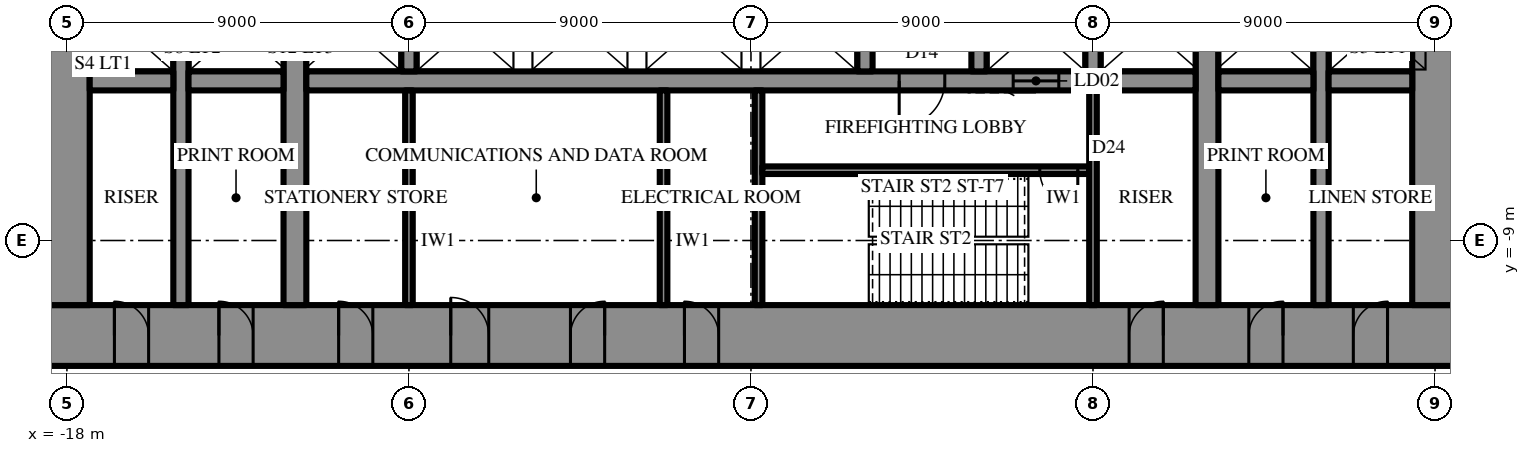
"""IFC4 building model, lengths in metres.
Left out: names, types, materials, properties, quantities, classifications, styles, units other than length and angle.
Written with IfcOpenShell. Run it as: python <this file> out.ifc"""

import sys

from ifc_helpers import new_model, si_unit, direction, frame, frame_2d, origin, place, context, subcontext, project, spatial, rectangle, extrude, element, fill, save


model = new_model("IFC4")
c1 = context("Model", 3, precision=1e-05, world=origin(), true_north=direction((0.0, 1.0)))
c2 = subcontext(c1, "Body", "Model", "MODEL_VIEW")
j1 = project(units=[si_unit("LENGTHUNIT", "METRE"), si_unit("PLANEANGLEUNIT", "RADIAN")], contexts=[c1])
p1 = place(None, origin())
s1 = spatial("IfcSite", under=j1, at=p1, CompositionType="ELEMENT")
p2 = place(p1, origin())
s2 = spatial("IfcBuilding", under=s1, at=p2, CompositionType="ELEMENT")
p3 = place(p2, frame((0.0, 0.0, 13.0)))
s3 = spatial("IfcBuildingStorey", under=s2, at=p3, CompositionType="ELEMENT", Elevation=13.0)
p4 = place(p3, frame((18.6, -11.5, 0.0), z_axis=(0.0, 0.0, 1.0), x_axis=(-1.0, 0.0, 0.0)))
e1 = element("IfcWall", 1, at=p4, inside=s3, PredefinedType="SHEAR", context=c2, shape_type="SweptSolid", body=[
    extrude(rectangle(XDim=37.2, YDim=1.6, at=frame_2d((18.6, 0.0))), origin(), (0.0, 0.0, 1.0), 5.5),
])
p5 = place(p4, frame((19.45, 0.0, 0.0)))
e2 = element("IfcOpeningElement", 2, at=p5, cuts=e1, PredefinedType="OPENING", context=c2, shape_type="SweptSolid", body=[
    extrude(rectangle(XDim=0.9, YDim=2.2, at=frame_2d((0.45, 1.1))), frame((0.0, 0.81, 0.0), z_axis=(0.0, -1.0, 0.0), x_axis=(1.0, 0.0, 0.0)), (0.0, 0.0, 1.0), 1.62),
])
p6 = place(p4, frame((22.45, 0.0, 0.0)))
e3 = element("IfcOpeningElement", 3, at=p6, cuts=e1, PredefinedType="OPENING", context=c2, shape_type="SweptSolid", body=[
    extrude(rectangle(XDim=0.9, YDim=2.2, at=frame_2d((0.45, 1.1))), frame((0.0, 0.81, 0.0), z_axis=(0.0, -1.0, 0.0), x_axis=(1.0, 0.0, 0.0)), (0.0, 0.0, 1.0), 1.62),
])
p7 = place(p4, frame((25.5, 0.0, 0.0)))
e4 = element("IfcOpeningElement", 4, at=p7, cuts=e1, PredefinedType="OPENING", context=c2, shape_type="SweptSolid", body=[
    extrude(rectangle(XDim=1.0, YDim=2.2, at=frame_2d((0.5, 1.1))), frame((0.0, 0.81, 0.0), z_axis=(0.0, -1.0, 0.0), x_axis=(1.0, 0.0, 0.0)), (0.0, 0.0, 1.0), 1.62),
])
p8 = place(p4, frame((1.85, 0.0, 0.0)))
e5 = element("IfcOpeningElement", 5, at=p8, cuts=e1, PredefinedType="OPENING", context=c2, shape_type="SweptSolid", body=[
    extrude(rectangle(XDim=0.9, YDim=2.2, at=frame_2d((0.45, 1.1))), frame((0.0, 0.81, 0.0), z_axis=(0.0, -1.0, 0.0), x_axis=(1.0, 0.0, 0.0)), (0.0, 0.0, 1.0), 1.62),
])
p9 = place(p4, frame((4.6, 0.0, 0.0)))
e6 = element("IfcOpeningElement", 6, at=p9, cuts=e1, PredefinedType="OPENING", context=c2, shape_type="SweptSolid", body=[
    extrude(rectangle(XDim=0.9, YDim=2.2, at=frame_2d((0.45, 1.1))), frame((0.0, 0.81, 0.0), z_axis=(0.0, -1.0, 0.0), x_axis=(1.0, 0.0, 0.0)), (0.0, 0.0, 1.0), 1.62),
])
p10 = place(p4, frame((7.75, 0.0, 0.0)))
e7 = element("IfcOpeningElement", 7, at=p10, cuts=e1, PredefinedType="OPENING", context=c2, shape_type="SweptSolid", body=[
    extrude(rectangle(XDim=0.9, YDim=2.2, at=frame_2d((0.45, 1.1))), frame((0.0, 0.81, 0.0), z_axis=(0.0, -1.0, 0.0), x_axis=(1.0, 0.0, 0.0)), (0.0, 0.0, 1.0), 1.62),
])
p11 = place(p4, frame((28.55, 0.0, 0.0)))
e8 = element("IfcOpeningElement", 8, at=p11, cuts=e1, PredefinedType="OPENING", context=c2, shape_type="SweptSolid", body=[
    extrude(rectangle(XDim=0.9, YDim=2.2, at=frame_2d((0.45, 1.1))), frame((0.0, 0.81, 0.0), z_axis=(0.0, -1.0, 0.0), x_axis=(1.0, 0.0, 0.0)), (0.0, 0.0, 1.0), 1.62),
])
p12 = place(p4, frame((31.7, 0.0, 0.0)))
e9 = element("IfcOpeningElement", 9, at=p12, cuts=e1, PredefinedType="OPENING", context=c2, shape_type="SweptSolid", body=[
    extrude(rectangle(XDim=0.9, YDim=2.2, at=frame_2d((0.45, 1.1))), frame((0.0, 0.81, 0.0), z_axis=(0.0, -1.0, 0.0), x_axis=(1.0, 0.0, 0.0)), (0.0, 0.0, 1.0), 1.62),
])
p13 = place(p4, frame((34.45, 0.0, 0.0)))
e10 = element("IfcOpeningElement", 10, at=p13, cuts=e1, PredefinedType="OPENING", context=c2, shape_type="SweptSolid", body=[
    extrude(rectangle(XDim=0.9, YDim=2.2, at=frame_2d((0.45, 1.1))), frame((0.0, 0.81, 0.0), z_axis=(0.0, -1.0, 0.0), x_axis=(1.0, 0.0, 0.0)), (0.0, 0.0, 1.0), 1.62),
])
p14 = place(p3, frame((18.0, -10.7, 0.0), z_axis=(0.0, 0.0, 1.0), x_axis=(0.0, 1.0, 0.0)))
e11 = element("IfcWall", 11, at=p14, inside=s3, PredefinedType="SHEAR", context=c2, shape_type="SweptSolid", body=[
    extrude(rectangle(XDim=21.4, YDim=1.2, at=frame_2d((10.7, 0.0))), origin(), (0.0, 0.0, 1.0), 5.5),
])
p15 = place(p14, frame((9.8, 0.0, 0.0)))
e12 = element("IfcOpeningElement", 12, at=p15, cuts=e11, PredefinedType="OPENING", context=c2, shape_type="SweptSolid", body=[
    extrude(rectangle(XDim=1.8, YDim=2.4, at=frame_2d((0.9, 1.2))), frame((0.0, 0.61, 0.0), z_axis=(0.0, -1.0, 0.0), x_axis=(1.0, 0.0, 0.0)), (0.0, 0.0, 1.0), 1.22),
])
p16 = place(p3, frame((-18.0, 10.7, 0.0), z_axis=(0.0, 0.0, 1.0), x_axis=(0.0, -1.0, 0.0)))
e13 = element("IfcWall", 13, at=p16, inside=s3, PredefinedType="SHEAR", context=c2, shape_type="SweptSolid", body=[
    extrude(rectangle(XDim=21.4, YDim=1.2, at=frame_2d((10.7, 0.0))), origin(), (0.0, 0.0, 1.0), 5.5),
])
p17 = place(p16, frame((9.8, 0.0, 0.0)))
e14 = element("IfcOpeningElement", 14, at=p17, cuts=e13, PredefinedType="OPENING", context=c2, shape_type="SweptSolid", body=[
    extrude(rectangle(XDim=1.8, YDim=2.4, at=frame_2d((0.9, 1.2))), frame((0.0, 0.61, 0.0), z_axis=(0.0, -1.0, 0.0), x_axis=(1.0, 0.0, 0.0)), (0.0, 0.0, 1.0), 1.22),
])
p18 = place(p3, frame((12.0, -10.7, 0.0), z_axis=(0.0, 0.0, 1.0), x_axis=(0.0, 1.0, 0.0)))
e15 = element("IfcWall", 15, at=p18, inside=s3, PredefinedType="SHEAR", context=c2, shape_type="SweptSolid", body=[
    extrude(rectangle(XDim=21.4, YDim=0.6, at=frame_2d((10.7, 0.0))), origin(), (0.0, 0.0, 1.0), 5.5),
])
p19 = place(p18, frame((9.8, 0.0, 0.0)))
e16 = element("IfcOpeningElement", 16, at=p19, cuts=e15, PredefinedType="OPENING", context=c2, shape_type="SweptSolid", body=[
    extrude(rectangle(XDim=1.8, YDim=2.4, at=frame_2d((0.9, 1.2))), frame((0.0, 0.31, 0.0), z_axis=(0.0, -1.0, 0.0), x_axis=(1.0, 0.0, 0.0)), (0.0, 0.0, 1.0), 0.62),
])
p20 = place(p3, frame((-12.0, -10.7, 0.0), z_axis=(0.0, 0.0, 1.0), x_axis=(0.0, 1.0, 0.0)))
e17 = element("IfcWall", 17, at=p20, inside=s3, PredefinedType="SHEAR", context=c2, shape_type="SweptSolid", body=[
    extrude(rectangle(XDim=21.4, YDim=0.6, at=frame_2d((10.7, 0.0))), origin(), (0.0, 0.0, 1.0), 5.5),
])
p21 = place(p20, frame((9.8, 0.0, 0.0)))
e18 = element("IfcOpeningElement", 18, at=p21, cuts=e17, PredefinedType="OPENING", context=c2, shape_type="SweptSolid", body=[
    extrude(rectangle(XDim=1.8, YDim=2.4, at=frame_2d((0.9, 1.2))), frame((0.0, 0.31, 0.0), z_axis=(0.0, -1.0, 0.0), x_axis=(1.0, 0.0, 0.0)), (0.0, 0.0, 1.0), 0.62),
])
p22 = place(p3, frame((15.0, -10.7, 0.0), z_axis=(0.0, 0.0, 1.0), x_axis=(0.0, 1.0, 0.0)))
e19 = element("IfcWall", 19, at=p22, inside=s3, PredefinedType="SHEAR", context=c2, shape_type="SweptSolid", body=[
    extrude(rectangle(XDim=21.4, YDim=0.4, at=frame_2d((10.7, 0.0))), origin(), (0.0, 0.0, 1.0), 5.5),
])
p23 = place(p22, frame((9.8, 0.0, 0.0)))
e20 = element("IfcOpeningElement", 20, at=p23, cuts=e19, PredefinedType="OPENING", context=c2, shape_type="SweptSolid", body=[
    extrude(rectangle(XDim=1.8, YDim=2.4, at=frame_2d((0.9, 1.2))), frame((0.0, 0.21, 0.0), z_axis=(0.0, -1.0, 0.0), x_axis=(1.0, 0.0, 0.0)), (0.0, 0.0, 1.0), 0.42),
])
p24 = place(p3, frame((-15.0, -10.7, 0.0), z_axis=(0.0, 0.0, 1.0), x_axis=(0.0, 1.0, 0.0)))
e21 = element("IfcWall", 21, at=p24, inside=s3, PredefinedType="SHEAR", context=c2, shape_type="SweptSolid", body=[
    extrude(rectangle(XDim=21.4, YDim=0.4, at=frame_2d((10.7, 0.0))), origin(), (0.0, 0.0, 1.0), 5.5),
])
p25 = place(p24, frame((9.8, 0.0, 0.0)))
e22 = element("IfcOpeningElement", 22, at=p25, cuts=e21, PredefinedType="OPENING", context=c2, shape_type="SweptSolid", body=[
    extrude(rectangle(XDim=1.8, YDim=2.4, at=frame_2d((0.9, 1.2))), frame((0.0, 0.21, 0.0), z_axis=(0.0, -1.0, 0.0), x_axis=(1.0, 0.0, 0.0)), (0.0, 0.0, 1.0), 0.42),
])
p26 = place(p3, frame((17.4, -4.8, 0.0), z_axis=(0.0, 0.0, 1.0), x_axis=(-1.0, 0.0, 0.0)))
e23 = element("IfcWall", 23, at=p26, inside=s3, PredefinedType="SHEAR", context=c2, shape_type="SweptSolid", body=[
    extrude(rectangle(XDim=2.2, YDim=0.5, at=frame_2d((1.1, 0.0))), origin(), (0.0, 0.0, 1.0), 5.5),
])
p27 = place(p3, frame((14.8, -4.8, 0.0), z_axis=(0.0, 0.0, 1.0), x_axis=(-1.0, 0.0, 0.0)))
e24 = element("IfcWall", 24, at=p27, inside=s3, PredefinedType="SHEAR", context=c2, shape_type="SweptSolid", body=[
    extrude(rectangle(XDim=2.5, YDim=0.5, at=frame_2d((1.25, 0.0))), origin(), (0.0, 0.0, 1.0), 5.5),
])
p28 = place(p3, frame((11.7, -4.8, 0.0), z_axis=(0.0, 0.0, 1.0), x_axis=(-1.0, 0.0, 0.0)))
e25 = element("IfcWall", 25, at=p28, inside=s3, PredefinedType="SHEAR", context=c2, shape_type="SweptSolid", body=[
    extrude(rectangle(XDim=23.4, YDim=0.5, at=frame_2d((11.7, 0.0))), origin(), (0.0, 0.0, 1.0), 5.5),
])
p29 = place(p28, frame((6.6, 0.0, 0.0)))
e26 = element("IfcOpeningElement", 26, at=p29, cuts=e25, PredefinedType="OPENING", context=c2, shape_type="SweptSolid", body=[
    extrude(rectangle(XDim=1.2, YDim=2.2, at=frame_2d((0.6, 1.1))), frame((0.0, 0.26, 0.0), z_axis=(0.0, -1.0, 0.0), x_axis=(1.0, 0.0, 0.0)), (0.0, 0.0, 1.0), 0.52),
])
p30 = place(p28, frame((3.6, 0.0, 0.0)))
e27 = element("IfcOpeningElement", 27, at=p30, cuts=e25, PredefinedType="OPENING", context=c2, shape_type="SweptSolid", body=[
    extrude(rectangle(XDim=1.2, YDim=2.2, at=frame_2d((0.6, 1.1))), frame((0.0, 0.26, 0.0), z_axis=(0.0, -1.0, 0.0), x_axis=(1.0, 0.0, 0.0)), (0.0, 0.0, 1.0), 0.52),
])
p31 = place(p3, frame((-12.3, -4.8, 0.0), z_axis=(0.0, 0.0, 1.0), x_axis=(-1.0, 0.0, 0.0)))
e28 = element("IfcWall", 28, at=p31, inside=s3, PredefinedType="SHEAR", context=c2, shape_type="SweptSolid", body=[
    extrude(rectangle(XDim=2.5, YDim=0.5, at=frame_2d((1.25, 0.0))), origin(), (0.0, 0.0, 1.0), 5.5),
])
p32 = place(p3, frame((-15.2, -4.8, 0.0), z_axis=(0.0, 0.0, 1.0), x_axis=(-1.0, 0.0, 0.0)))
e29 = element("IfcWall", 29, at=p32, inside=s3, PredefinedType="SHEAR", context=c2, shape_type="SweptSolid", body=[
    extrude(rectangle(XDim=2.2, YDim=0.5, at=frame_2d((1.1, 0.0))), origin(), (0.0, 0.0, 1.0), 5.5),
])
for number, where, z_axis, x_axis in (
    (30, (9.0, -2.25, 0.0), (0.0, 0.0, 1.0), (0.0, -1.0, 0.0)),
    (31, (6.0, -2.25, 0.0), (0.0, 0.0, 1.0), (0.0, -1.0, 0.0)),
    (32, (3.0, -2.25, 0.0), (0.0, 0.0, 1.0), (0.0, -1.0, 0.0)),
    (33, (-9.0, -2.25, 0.0), (0.0, 0.0, 1.0), (0.0, -1.0, 0.0)),
):
    element("IfcWall", number, at=place(p3, frame(where, z_axis=z_axis, x_axis=x_axis)), inside=s3, PredefinedType="SHEAR", context=c2, shape_type="SweptSolid", body=[
        extrude(rectangle(XDim=2.3, YDim=0.4, at=frame_2d((1.15, 0.0))), origin(), (0.0, 0.0, 1.0), 5.5),
    ])
p33 = place(p3, frame((0.2, -5.05, 0.0), z_axis=(0.0, 0.0, 1.0), x_axis=(0.0, -1.0, 0.0)))
e34 = element("IfcWall", 34, at=p33, inside=s3, PredefinedType="SHEAR", context=c2, shape_type="SweptSolid", body=[
    extrude(rectangle(XDim=5.65, YDim=0.2, at=frame_2d((2.825, 0.0))), origin(), (0.0, 0.0, 1.0), 5.5),
])
p34 = place(p3, frame((8.9, -7.15, 0.0), z_axis=(0.0, 0.0, 1.0), x_axis=(-1.0, 0.0, 0.0)))
e35 = element("IfcWall", 35, at=p34, inside=s3, PredefinedType="SHEAR", context=c2, shape_type="SweptSolid", body=[
    extrude(rectangle(XDim=8.6, YDim=0.2, at=frame_2d((4.3, 0.0))), origin(), (0.0, 0.0, 1.0), 5.5),
])
p35 = place(p34, frame((0.3, 0.0, 0.0)))
e36 = element("IfcOpeningElement", 36, at=p35, cuts=e35, PredefinedType="OPENING", context=c2, shape_type="SweptSolid", body=[
    extrude(rectangle(XDim=1.0, YDim=2.2, at=frame_2d((0.5, 1.1))), frame((0.0, 0.11, 0.0), z_axis=(0.0, -1.0, 0.0), x_axis=(1.0, 0.0, 0.0)), (0.0, 0.0, 1.0), 0.22),
])
for number, where, z_axis, x_axis in (
    (37, (9.0, -5.05, 0.0), (0.0, 0.0, 1.0), (0.0, -1.0, 0.0)),
    (38, (-9.0, -5.05, 0.0), (0.0, 0.0, 1.0), (0.0, -1.0, 0.0)),
    (39, (-2.3, -5.05, 0.0), (0.0, 0.0, 1.0), (0.0, -1.0, 0.0)),
):
    element("IfcWall", number, at=place(p3, frame(where, z_axis=z_axis, x_axis=x_axis)), inside=s3, PredefinedType="PARTITIONING", context=c2, shape_type="SweptSolid", body=[
        extrude(rectangle(XDim=5.65, YDim=0.2, at=frame_2d((2.825, 0.0))), origin(), (0.0, 0.0, 1.0), 5.15),
    ])
p36 = place(p29, origin())
e40 = element("IfcDoor", 40, at=p36, inside=s3, OperationType="SINGLE_SWING_LEFT", PredefinedType="DOOR", context=c2, shape_type="SweptSolid", body=[
    extrude(rectangle(XDim=1.2, YDim=2.2, at=frame_2d((0.6, 1.1))), frame((0.0, 0.025, 0.0), z_axis=(0.0, -1.0, 0.0), x_axis=(1.0, 0.0, 0.0)), (0.0, 0.0, 1.0), 0.05),
])
fill(e26, e40)
p37 = place(p35, origin())
e41 = element("IfcDoor", 41, at=p37, inside=s3, OperationType="SINGLE_SWING_RIGHT", PredefinedType="DOOR", context=c2, shape_type="SweptSolid", body=[
    extrude(rectangle(XDim=1.0, YDim=2.2, at=frame_2d((0.5, 1.1))), frame((0.0, 0.025, 0.0), z_axis=(0.0, -1.0, 0.0), x_axis=(1.0, 0.0, 0.0)), (0.0, 0.0, 1.0), 0.05),
])
fill(e36, e41)
p38 = place(p5, frame((0.9, 0.0, 0.0), z_axis=(0.0, 0.0, 1.0), x_axis=(-1.0, 0.0, 0.0)))
e42 = element("IfcDoor", 42, at=p38, inside=s3, OperationType="SINGLE_SWING_RIGHT", PredefinedType="DOOR", context=c2, shape_type="SweptSolid", body=[
    extrude(rectangle(XDim=0.9, YDim=2.2, at=frame_2d((0.45, 1.1))), frame((0.0, 0.025, 0.0), z_axis=(0.0, -1.0, 0.0), x_axis=(1.0, 0.0, 0.0)), (0.0, 0.0, 1.0), 0.05),
])
fill(e2, e42)
p39 = place(p6, frame((0.9, 0.0, 0.0), z_axis=(0.0, 0.0, 1.0), x_axis=(-1.0, 0.0, 0.0)))
e43 = element("IfcDoor", 43, at=p39, inside=s3, OperationType="SINGLE_SWING_LEFT", PredefinedType="DOOR", context=c2, shape_type="SweptSolid", body=[
    extrude(rectangle(XDim=0.9, YDim=2.2, at=frame_2d((0.45, 1.1))), frame((0.0, 0.025, 0.0), z_axis=(0.0, -1.0, 0.0), x_axis=(1.0, 0.0, 0.0)), (0.0, 0.0, 1.0), 0.05),
])
fill(e3, e43)
p40 = place(p7, frame((1.0, 0.0, 0.0), z_axis=(0.0, 0.0, 1.0), x_axis=(-1.0, 0.0, 0.0)))
e44 = element("IfcDoor", 44, at=p40, inside=s3, OperationType="SINGLE_SWING_RIGHT", PredefinedType="DOOR", context=c2, shape_type="SweptSolid", body=[
    extrude(rectangle(XDim=1.0, YDim=2.2, at=frame_2d((0.5, 1.1))), frame((0.0, 0.025, 0.0), z_axis=(0.0, -1.0, 0.0), x_axis=(1.0, 0.0, 0.0)), (0.0, 0.0, 1.0), 0.05),
])
fill(e4, e44)
p41 = place(p8, frame((0.9, 0.0, 0.0), z_axis=(0.0, 0.0, 1.0), x_axis=(-1.0, 0.0, 0.0)))
e45 = element("IfcDoor", 45, at=p41, inside=s3, OperationType="SINGLE_SWING_LEFT", PredefinedType="DOOR", context=c2, shape_type="SweptSolid", body=[
    extrude(rectangle(XDim=0.9, YDim=2.2, at=frame_2d((0.45, 1.1))), frame((0.0, 0.025, 0.0), z_axis=(0.0, -1.0, 0.0), x_axis=(1.0, 0.0, 0.0)), (0.0, 0.0, 1.0), 0.05),
])
fill(e5, e45)
p42 = place(p9, frame((0.9, 0.0, 0.0), z_axis=(0.0, 0.0, 1.0), x_axis=(-1.0, 0.0, 0.0)))
e46 = element("IfcDoor", 46, at=p42, inside=s3, OperationType="SINGLE_SWING_LEFT", PredefinedType="DOOR", context=c2, shape_type="SweptSolid", body=[
    extrude(rectangle(XDim=0.9, YDim=2.2, at=frame_2d((0.45, 1.1))), frame((0.0, 0.025, 0.0), z_axis=(0.0, -1.0, 0.0), x_axis=(1.0, 0.0, 0.0)), (0.0, 0.0, 1.0), 0.05),
])
fill(e6, e46)
p43 = place(p10, frame((0.9, 0.0, 0.0), z_axis=(0.0, 0.0, 1.0), x_axis=(-1.0, 0.0, 0.0)))
e47 = element("IfcDoor", 47, at=p43, inside=s3, OperationType="SINGLE_SWING_LEFT", PredefinedType="DOOR", context=c2, shape_type="SweptSolid", body=[
    extrude(rectangle(XDim=0.9, YDim=2.2, at=frame_2d((0.45, 1.1))), frame((0.0, 0.025, 0.0), z_axis=(0.0, -1.0, 0.0), x_axis=(1.0, 0.0, 0.0)), (0.0, 0.0, 1.0), 0.05),
])
fill(e7, e47)
p44 = place(p11, frame((0.9, 0.0, 0.0), z_axis=(0.0, 0.0, 1.0), x_axis=(-1.0, 0.0, 0.0)))
e48 = element("IfcDoor", 48, at=p44, inside=s3, OperationType="SINGLE_SWING_RIGHT", PredefinedType="DOOR", context=c2, shape_type="SweptSolid", body=[
    extrude(rectangle(XDim=0.9, YDim=2.2, at=frame_2d((0.45, 1.1))), frame((0.0, 0.025, 0.0), z_axis=(0.0, -1.0, 0.0), x_axis=(1.0, 0.0, 0.0)), (0.0, 0.0, 1.0), 0.05),
])
fill(e8, e48)
p45 = place(p12, frame((0.9, 0.0, 0.0), z_axis=(0.0, 0.0, 1.0), x_axis=(-1.0, 0.0, 0.0)))
e49 = element("IfcDoor", 49, at=p45, inside=s3, OperationType="SINGLE_SWING_RIGHT", PredefinedType="DOOR", context=c2, shape_type="SweptSolid", body=[
    extrude(rectangle(XDim=0.9, YDim=2.2, at=frame_2d((0.45, 1.1))), frame((0.0, 0.025, 0.0), z_axis=(0.0, -1.0, 0.0), x_axis=(1.0, 0.0, 0.0)), (0.0, 0.0, 1.0), 0.05),
])
fill(e9, e49)
p46 = place(p13, frame((0.9, 0.0, 0.0), z_axis=(0.0, 0.0, 1.0), x_axis=(-1.0, 0.0, 0.0)))
e50 = element("IfcDoor", 50, at=p46, inside=s3, OperationType="SINGLE_SWING_RIGHT", PredefinedType="DOOR", context=c2, shape_type="SweptSolid", body=[
    extrude(rectangle(XDim=0.9, YDim=2.2, at=frame_2d((0.45, 1.1))), frame((0.0, 0.025, 0.0), z_axis=(0.0, -1.0, 0.0), x_axis=(1.0, 0.0, 0.0)), (0.0, 0.0, 1.0), 0.05),
])
fill(e10, e50)
p47 = place(p30, origin())
e51 = element("IfcDoor", 51, at=p47, inside=s3, OperationType="SLIDING_TO_LEFT", PredefinedType="DOOR", context=c2, shape_type="SweptSolid", body=[
    extrude(rectangle(XDim=1.2, YDim=2.2, at=frame_2d((0.6, 1.1))), frame((0.0, 0.025, 0.0), z_axis=(0.0, -1.0, 0.0), x_axis=(1.0, 0.0, 0.0)), (0.0, 0.0, 1.0), 0.05),
])
fill(e27, e51)
save(model, sys.argv[1])
